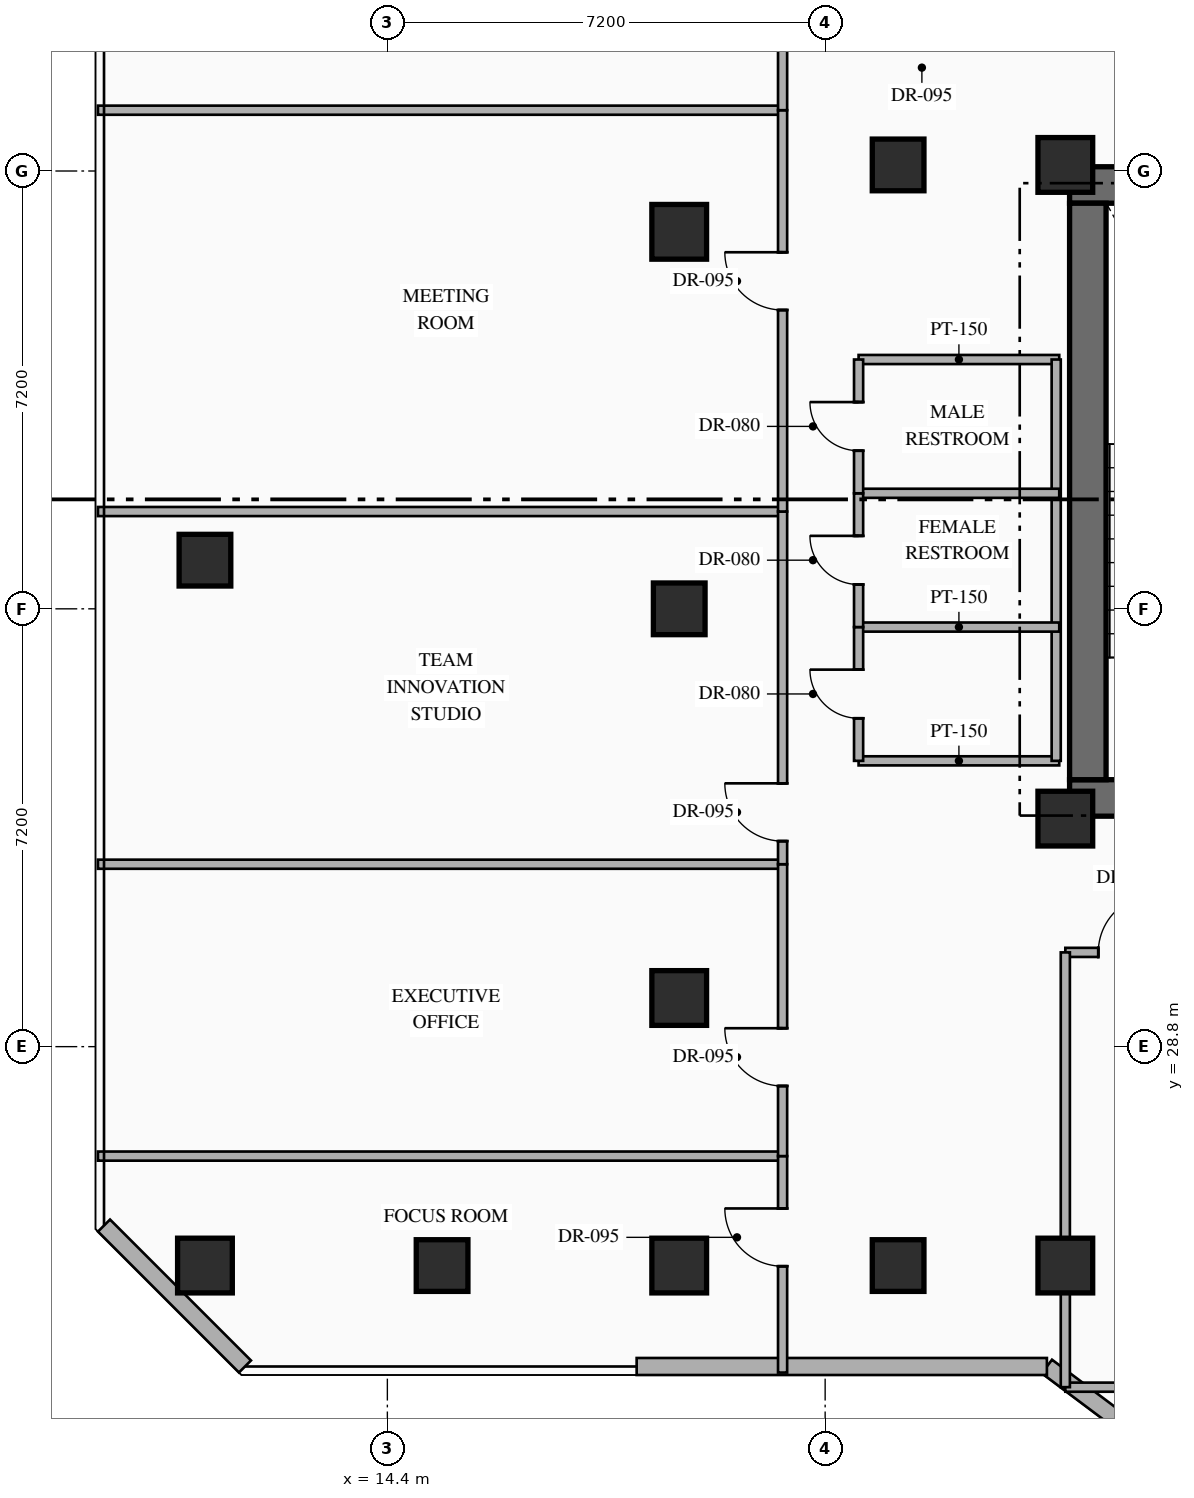
"""IFC4 building model, lengths in metres.
Left out: names, types, materials, properties, quantities, classifications, styles, units other than length and angle.
Written with IfcOpenShell. Run it as: python <this file> out.ifc"""

import sys

from ifc_helpers import new_model, si_unit, direction, frame, frame_2d, origin, origin_2d, place, context, subcontext, project, spatial, rectangle, hollow_rectangle, extrude, element, fill, save


model = new_model("IFC4")
c1 = context("Model", 3, precision=1e-05, world=origin(), true_north=direction((0.0, 1.0)))
c2 = subcontext(c1, "Body", "Model", "MODEL_VIEW")
j1 = project(units=[si_unit("LENGTHUNIT", "METRE"), si_unit("PLANEANGLEUNIT", "RADIAN")], contexts=[c1])
p1 = place(None, origin())
s1 = spatial("IfcSite", under=j1, at=p1, CompositionType="ELEMENT")
p2 = place(p1, origin())
s2 = spatial("IfcBuilding", under=s1, at=p2, CompositionType="ELEMENT")
p3 = place(p2, frame((0.0, 0.0, 122.85)))
s3 = spatial("IfcBuildingStorey", under=s2, at=p3, CompositionType="ELEMENT", Elevation=122.85)
p4 = place(p3, frame((25.62, 32.89, 0.0), z_axis=(0.0, 0.0, 1.0), x_axis=(1.0, 0.0, 0.0)))
e1 = element("IfcWall", 1, at=p4, inside=s3, PredefinedType="SHEAR", context=c2, shape_type="SweptSolid", body=[
    extrude(rectangle(XDim=7.78, YDim=0.6, at=frame_2d((3.89, 0.0))), origin(), (0.0, 0.0, 1.0), 3.6),
])
p5 = place(p4, frame((2.83, 0.0, 0.0)))
e2 = element("IfcOpeningElement", 2, at=p5, cuts=e1, PredefinedType="OPENING", context=c2, shape_type="SweptSolid", body=[
    extrude(rectangle(XDim=1.1, YDim=2.2, at=frame_2d((0.55, 1.1))), frame((0.0, 0.31, 0.0), z_axis=(0.0, -1.0, 0.0), x_axis=(1.0, 0.0, 0.0)), (0.0, 0.0, 1.0), 0.62),
])
p6 = place(p4, frame((5.58, 0.0, 0.0)))
e3 = element("IfcOpeningElement", 3, at=p6, cuts=e1, PredefinedType="OPENING", context=c2, shape_type="SweptSolid", body=[
    extrude(rectangle(XDim=1.1, YDim=2.15, at=frame_2d((0.55, 1.075))), frame((0.0, 0.31, 0.0), z_axis=(0.0, -1.0, 0.0), x_axis=(1.0, 0.0, 0.0)), (0.0, 0.0, 1.0), 0.62),
])
p7 = place(p3, frame((25.62, 42.97, 0.0), z_axis=(0.0, 0.0, 1.0), x_axis=(1.0, 0.0, 0.0)))
e4 = element("IfcWall", 4, at=p7, inside=s3, PredefinedType="SHEAR", context=c2, shape_type="SweptSolid", body=[
    extrude(rectangle(XDim=7.78, YDim=0.6, at=frame_2d((3.89, 0.0))), origin(), (0.0, 0.0, 1.0), 3.6),
])
p8 = place(p3, frame((25.92, 33.19, 0.0), z_axis=(0.0, 0.0, 1.0), x_axis=(0.0, 1.0, 0.0)))
e5 = element("IfcWall", 5, at=p8, inside=s3, PredefinedType="SHEAR", context=c2, shape_type="SweptSolid", body=[
    extrude(rectangle(XDim=9.48, YDim=0.6, at=frame_2d((4.74, 0.0))), origin(), (0.0, 0.0, 1.0), 3.6),
])
for number, where, z_axis, x_axis in (
    (6, (25.55, 32.55, 0.0), (0.0, 0.0, 1.0), (1.0, 0.0, 0.0)),
    (7, (25.55, 43.3, 0.0), (0.0, 0.0, 1.0), (1.0, 0.0, 0.0)),
):
    element("IfcColumn", number, at=place(p3, frame(where, z_axis=z_axis, x_axis=x_axis)), inside=s3, PredefinedType="COLUMN", context=c2, shape_type="SweptSolid", body=[
        extrude(rectangle(XDim=0.9, YDim=0.9, at=origin_2d()), origin(), (0.0, 0.0, 1.0), 3.6),
    ])
for number, where, z_axis, x_axis in (
    (8, (25.55, 25.2, 0.0), (0.0, 0.0, 1.0), (1.0, 0.0, 0.0)),
    (9, (11.4, 25.2, 0.0), (0.0, 0.0, 1.0), (1.0, 0.0, 0.0)),
    (10, (19.2, 25.2, 0.0), (0.0, 0.0, 1.0), (1.0, 0.0, 0.0)),
    (11, (19.2, 29.6, 0.0), (0.0, 0.0, 1.0), (1.0, 0.0, 0.0)),
    (12, (19.2, 42.2, 0.0), (0.0, 0.0, 1.0), (1.0, 0.0, 0.0)),
):
    element("IfcColumn", number, at=place(p3, frame(where, z_axis=z_axis, x_axis=x_axis)), inside=s3, PredefinedType="COLUMN", context=c2, shape_type="SweptSolid", body=[
        extrude(hollow_rectangle(XDim=0.9, YDim=0.9, WallThickness=0.036, at=origin_2d()), origin(), (0.0, 0.0, 1.0), 3.6),
    ])
for number, where, z_axis, x_axis in (
    (13, (22.8, 25.2, 0.0), (0.0, 0.0, 1.0), (1.0, 0.0, 0.0)),
    (14, (22.8, 43.3, 0.0), (0.0, 0.0, 1.0), (1.0, 0.0, 0.0)),
    (15, (11.4, 36.8, 0.0), (0.0, 0.0, 1.0), (1.0, 0.0, 0.0)),
    (16, (19.2, 36.0, 0.0), (0.0, 0.0, 1.0), (1.0, 0.0, 0.0)),
    (17, (15.3, 25.2, 0.0), (0.0, 0.0, 1.0), (1.0, 0.0, 0.0)),
):
    element("IfcColumn", number, at=place(p3, frame(where, z_axis=z_axis, x_axis=x_axis)), inside=s3, PredefinedType="COLUMN", context=c2, shape_type="SweptSolid", body=[
        extrude(hollow_rectangle(XDim=0.85, YDim=0.85, WallThickness=0.032, at=origin_2d()), origin(), (0.0, 0.0, 1.0), 3.6),
    ])
p9 = place(p3, frame((53.318, 2.487, 0.0), z_axis=(0.0, 0.0, 1.0), x_axis=(-0.800004174678, 0.599994433723, 0.0)))
e18 = element("IfcWall", 18, at=p9, inside=s3, PredefinedType="STANDARD", context=c2, shape_type="SweptSolid", body=[
    extrude(rectangle(XDim=35.089, YDim=0.28, at=frame_2d((17.544, 0.0))), origin(), (0.0, 0.0, 1.0), 3.35),
])
p10 = place(p3, frame((25.247, 23.54, 0.0), z_axis=(0.0, 0.0, 1.0), x_axis=(-1.0, 0.0, 0.0)))
e19 = element("IfcWall", 19, at=p10, inside=s3, PredefinedType="STANDARD", context=c2, shape_type="SweptSolid", body=[
    extrude(rectangle(XDim=6.747, YDim=0.28, at=frame_2d((3.374, 0.0))), origin(), (0.0, 0.0, 1.0), 3.35),
])
p11 = place(p3, frame((12.058, 23.54, 0.0), z_axis=(0.0, 0.0, 1.0), x_axis=(-0.707144017911, 0.707069542501, 0.0)))
e20 = element("IfcWall", 20, at=p11, inside=s3, PredefinedType="STANDARD", context=c2, shape_type="SweptSolid", body=[
    extrude(rectangle(XDim=3.278, YDim=0.28, at=frame_2d((1.639, 0.0))), origin(), (0.0, 0.0, 1.0), 3.35),
])
for number, where, z_axis, x_axis in (
    (21, (22.15, 33.5, 0.0), (0.0, 0.0, 1.0), (1.0, 0.0, 0.0)),
    (22, (22.15, 40.1, 0.0), (0.0, 0.0, 1.0), (1.0, 0.0, 0.0)),
):
    element("IfcWall", number, at=place(p3, frame(where, z_axis=z_axis, x_axis=x_axis)), inside=s3, PredefinedType="PARTITIONING", context=c2, shape_type="SweptSolid", body=[
        extrude(rectangle(XDim=3.3, YDim=0.15, at=frame_2d((1.65, 0.0))), origin(), (0.0, 0.0, 1.0), 3.35),
    ])
p12 = place(p3, frame((25.4, 33.5, 0.0), z_axis=(0.0, 0.0, 1.0), x_axis=(0.0, 1.0, 0.0)))
e23 = element("IfcWall", 23, at=p12, inside=s3, PredefinedType="PARTITIONING", context=c2, shape_type="SweptSolid", body=[
    extrude(rectangle(XDim=6.6, YDim=0.15, at=frame_2d((3.3, 0.0))), origin(), (0.0, 0.0, 1.0), 3.35),
])
for number, where, z_axis, x_axis in (
    (24, (22.15, 35.7, 0.0), (0.0, 0.0, 1.0), (1.0, 0.0, 0.0)),
    (25, (22.15, 37.9, 0.0), (0.0, 0.0, 1.0), (1.0, 0.0, 0.0)),
):
    element("IfcWall", number, at=place(p3, frame(where, z_axis=z_axis, x_axis=x_axis)), inside=s3, PredefinedType="PARTITIONING", context=c2, shape_type="SweptSolid", body=[
        extrude(rectangle(XDim=3.3, YDim=0.15, at=frame_2d((1.65, 0.0))), origin(), (0.0, 0.0, 1.0), 3.35),
    ])
p13 = place(p3, frame((22.15, 33.5, 0.0), z_axis=(0.0, 0.0, 1.0), x_axis=(0.0, 1.0, 0.0)))
e26 = element("IfcWall", 26, at=p13, inside=s3, PredefinedType="PARTITIONING", context=c2, shape_type="SweptSolid", body=[
    extrude(rectangle(XDim=2.2, YDim=0.15, at=frame_2d((1.1, 0.0))), origin(), (0.0, 0.0, 1.0), 3.35),
])
p14 = place(p13, frame((0.7, 0.0, 0.0)))
e27 = element("IfcOpeningElement", 27, at=p14, cuts=e26, PredefinedType="OPENING", context=c2, shape_type="SweptSolid", body=[
    extrude(rectangle(XDim=0.8, YDim=2.06, at=frame_2d((0.4, 1.03))), frame((0.0, 0.085, 0.0), z_axis=(0.0, -1.0, 0.0), x_axis=(1.0, 0.0, 0.0)), (0.0, 0.0, 1.0), 0.17),
])
p15 = place(p3, frame((22.15, 35.7, 0.0), z_axis=(0.0, 0.0, 1.0), x_axis=(0.0, 1.0, 0.0)))
e28 = element("IfcWall", 28, at=p15, inside=s3, PredefinedType="PARTITIONING", context=c2, shape_type="SweptSolid", body=[
    extrude(rectangle(XDim=2.2, YDim=0.15, at=frame_2d((1.1, 0.0))), origin(), (0.0, 0.0, 1.0), 3.35),
])
p16 = place(p15, frame((0.7, 0.0, 0.0)))
e29 = element("IfcOpeningElement", 29, at=p16, cuts=e28, PredefinedType="OPENING", context=c2, shape_type="SweptSolid", body=[
    extrude(rectangle(XDim=0.8, YDim=2.06, at=frame_2d((0.4, 1.03))), frame((0.0, 0.085, 0.0), z_axis=(0.0, -1.0, 0.0), x_axis=(1.0, 0.0, 0.0)), (0.0, 0.0, 1.0), 0.17),
])
p17 = place(p3, frame((22.15, 37.9, 0.0), z_axis=(0.0, 0.0, 1.0), x_axis=(0.0, 1.0, 0.0)))
e30 = element("IfcWall", 30, at=p17, inside=s3, PredefinedType="PARTITIONING", context=c2, shape_type="SweptSolid", body=[
    extrude(rectangle(XDim=2.2, YDim=0.15, at=frame_2d((1.1, 0.0))), origin(), (0.0, 0.0, 1.0), 3.35),
])
p18 = place(p17, frame((0.7, 0.0, 0.0)))
e31 = element("IfcOpeningElement", 31, at=p18, cuts=e30, PredefinedType="OPENING", context=c2, shape_type="SweptSolid", body=[
    extrude(rectangle(XDim=0.8, YDim=2.06, at=frame_2d((0.4, 1.03))), frame((0.0, 0.085, 0.0), z_axis=(0.0, -1.0, 0.0), x_axis=(1.0, 0.0, 0.0)), (0.0, 0.0, 1.0), 0.17),
])
p19 = place(p3, frame((25.55, 23.2, 0.0), z_axis=(0.0, 0.0, 1.0), x_axis=(1.0, 0.0, 0.0)))
e32 = element("IfcWall", 32, at=p19, inside=s3, PredefinedType="PARTITIONING", context=c2, shape_type="SweptSolid", body=[
    extrude(rectangle(XDim=4.95, YDim=0.15, at=frame_2d((2.475, 0.0))), origin(), (0.0, 0.0, 1.0), 3.35),
])
p20 = place(p3, frame((25.55, 30.35, 0.0), z_axis=(0.0, 0.0, 1.0), x_axis=(1.0, 0.0, 0.0)))
e33 = element("IfcWall", 33, at=p20, inside=s3, PredefinedType="PARTITIONING", context=c2, shape_type="SweptSolid", body=[
    extrude(rectangle(XDim=4.95, YDim=0.15, at=frame_2d((2.475, 0.0))), origin(), (0.0, 0.0, 1.0), 3.35),
])
p21 = place(p20, frame((0.542, 0.0, 0.0)))
e34 = element("IfcOpeningElement", 34, at=p21, cuts=e33, PredefinedType="OPENING", context=c2, shape_type="SweptSolid", body=[
    extrude(rectangle(XDim=0.95, YDim=2.15, at=frame_2d((0.475, 1.075))), frame((0.0, 0.085, 0.0), z_axis=(0.0, -1.0, 0.0), x_axis=(1.0, 0.0, 0.0)), (0.0, 0.0, 1.0), 0.17),
])
p22 = place(p3, frame((25.55, 23.2, 0.0), z_axis=(0.0, 0.0, 1.0), x_axis=(0.0, 1.0, 0.0)))
e35 = element("IfcWall", 35, at=p22, inside=s3, PredefinedType="PARTITIONING", context=c2, shape_type="SweptSolid", body=[
    extrude(rectangle(XDim=7.15, YDim=0.15, at=frame_2d((3.575, 0.0))), origin(), (0.0, 0.0, 1.0), 2.695),
])
p23 = place(p3, frame((9.64, 27.0, 0.0), z_axis=(0.0, 0.0, 1.0), x_axis=(1.0, 0.0, 0.0)))
e36 = element("IfcWall", 36, at=p23, inside=s3, PredefinedType="PARTITIONING", context=c2, shape_type="SweptSolid", body=[
    extrude(rectangle(XDim=11.26, YDim=0.15, at=frame_2d((5.63, 0.0))), origin(), (0.0, 0.0, 1.0), 3.35),
])
p24 = place(p3, frame((20.9, 23.44, 0.0), z_axis=(0.0, 0.0, 1.0), x_axis=(0.0, 1.0, 0.0)))
e37 = element("IfcWall", 37, at=p24, inside=s3, PredefinedType="PARTITIONING", context=c2, shape_type="SweptSolid", body=[
    extrude(rectangle(XDim=3.56, YDim=0.15, at=frame_2d((1.78, 0.0))), origin(), (0.0, 0.0, 1.0), 3.35),
])
p25 = place(p24, frame((1.749, 0.0, 0.0)))
e38 = element("IfcOpeningElement", 38, at=p25, cuts=e37, PredefinedType="OPENING", context=c2, shape_type="SweptSolid", body=[
    extrude(rectangle(XDim=0.95, YDim=2.15, at=frame_2d((0.475, 1.075))), frame((0.0, 0.085, 0.0), z_axis=(0.0, -1.0, 0.0), x_axis=(1.0, 0.0, 0.0)), (0.0, 0.0, 1.0), 0.17),
])
p26 = place(p3, frame((9.64, 31.8, 0.0), z_axis=(0.0, 0.0, 1.0), x_axis=(1.0, 0.0, 0.0)))
e39 = element("IfcWall", 39, at=p26, inside=s3, PredefinedType="PARTITIONING", context=c2, shape_type="SweptSolid", body=[
    extrude(rectangle(XDim=11.26, YDim=0.15, at=frame_2d((5.63, 0.0))), origin(), (0.0, 0.0, 1.0), 3.35),
])
p27 = place(p3, frame((20.9, 27.0, 0.0), z_axis=(0.0, 0.0, 1.0), x_axis=(0.0, 1.0, 0.0)))
e40 = element("IfcWall", 40, at=p27, inside=s3, PredefinedType="PARTITIONING", context=c2, shape_type="SweptSolid", body=[
    extrude(rectangle(XDim=4.8, YDim=0.15, at=frame_2d((2.4, 0.0))), origin(), (0.0, 0.0, 1.0), 3.35),
])
p28 = place(p27, frame((1.153, 0.0, 0.0)))
e41 = element("IfcOpeningElement", 41, at=p28, cuts=e40, PredefinedType="OPENING", context=c2, shape_type="SweptSolid", body=[
    extrude(rectangle(XDim=0.95, YDim=2.15, at=frame_2d((0.475, 1.075))), frame((0.0, 0.085, 0.0), z_axis=(0.0, -1.0, 0.0), x_axis=(1.0, 0.0, 0.0)), (0.0, 0.0, 1.0), 0.17),
])
p29 = place(p3, frame((9.64, 37.6, 0.0), z_axis=(0.0, 0.0, 1.0), x_axis=(1.0, 0.0, 0.0)))
e42 = element("IfcWall", 42, at=p29, inside=s3, PredefinedType="PARTITIONING", context=c2, shape_type="SweptSolid", body=[
    extrude(rectangle(XDim=11.26, YDim=0.15, at=frame_2d((5.63, 0.0))), origin(), (0.0, 0.0, 1.0), 3.35),
])
p30 = place(p3, frame((20.9, 31.8, 0.0), z_axis=(0.0, 0.0, 1.0), x_axis=(0.0, 1.0, 0.0)))
e43 = element("IfcWall", 43, at=p30, inside=s3, PredefinedType="PARTITIONING", context=c2, shape_type="SweptSolid", body=[
    extrude(rectangle(XDim=5.8, YDim=0.15, at=frame_2d((2.9, 0.0))), origin(), (0.0, 0.0, 1.0), 3.35),
])
p31 = place(p30, frame((0.38, 0.0, 0.0)))
e44 = element("IfcOpeningElement", 44, at=p31, cuts=e43, PredefinedType="OPENING", context=c2, shape_type="SweptSolid", body=[
    extrude(rectangle(XDim=0.95, YDim=2.15, at=frame_2d((0.475, 1.075))), frame((0.0, 0.085, 0.0), z_axis=(0.0, -1.0, 0.0), x_axis=(1.0, 0.0, 0.0)), (0.0, 0.0, 1.0), 0.17),
])
p32 = place(p3, frame((9.64, 44.2, 0.0), z_axis=(0.0, 0.0, 1.0), x_axis=(1.0, 0.0, 0.0)))
e45 = element("IfcWall", 45, at=p32, inside=s3, PredefinedType="PARTITIONING", context=c2, shape_type="SweptSolid", body=[
    extrude(rectangle(XDim=11.26, YDim=0.15, at=frame_2d((5.63, 0.0))), origin(), (0.0, 0.0, 1.0), 3.35),
])
p33 = place(p3, frame((20.9, 37.6, 0.0), z_axis=(0.0, 0.0, 1.0), x_axis=(0.0, 1.0, 0.0)))
e46 = element("IfcWall", 46, at=p33, inside=s3, PredefinedType="PARTITIONING", context=c2, shape_type="SweptSolid", body=[
    extrude(rectangle(XDim=6.6, YDim=0.15, at=frame_2d((3.3, 0.0))), origin(), (0.0, 0.0, 1.0), 3.35),
])
p34 = place(p33, frame((3.314, 0.0, 0.0)))
e47 = element("IfcOpeningElement", 47, at=p34, cuts=e46, PredefinedType="OPENING", context=c2, shape_type="SweptSolid", body=[
    extrude(rectangle(XDim=0.95, YDim=2.15, at=frame_2d((0.475, 1.075))), frame((0.0, 0.085, 0.0), z_axis=(0.0, -1.0, 0.0), x_axis=(1.0, 0.0, 0.0)), (0.0, 0.0, 1.0), 0.17),
])
p35 = place(p3, frame((20.9, 44.2, 0.0), z_axis=(0.0, 0.0, 1.0), x_axis=(0.0, 1.0, 0.0)))
e48 = element("IfcWall", 48, at=p35, inside=s3, PredefinedType="PARTITIONING", context=c2, shape_type="SweptSolid", body=[
    extrude(rectangle(XDim=6.16, YDim=0.15, at=frame_2d((3.08, 0.0))), origin(), (0.0, 0.0, 1.0), 3.35),
])
p36 = place(p35, frame((2.605, 0.0, 0.0)))
e49 = element("IfcOpeningElement", 49, at=p36, cuts=e48, PredefinedType="OPENING", context=c2, shape_type="SweptSolid", body=[
    extrude(rectangle(XDim=0.95, YDim=2.15, at=frame_2d((0.475, 1.075))), frame((0.0, 0.085, 0.0), z_axis=(0.0, -1.0, 0.0), x_axis=(1.0, 0.0, 0.0)), (0.0, 0.0, 1.0), 0.17),
])
p37 = place(p14, origin())
e50 = element("IfcDoor", 50, at=p37, inside=s3, OperationType="SINGLE_SWING_RIGHT", PredefinedType="DOOR", context=c2, shape_type="SweptSolid", body=[
    extrude(rectangle(XDim=0.8, YDim=2.06, at=frame_2d((0.4, 1.03))), frame((0.0, 0.025, 0.0), z_axis=(0.0, -1.0, 0.0), x_axis=(1.0, 0.0, 0.0)), (0.0, 0.0, 1.0), 0.05),
])
fill(e27, e50)
p38 = place(p16, origin())
e51 = element("IfcDoor", 51, at=p38, inside=s3, OperationType="SINGLE_SWING_RIGHT", PredefinedType="DOOR", context=c2, shape_type="SweptSolid", body=[
    extrude(rectangle(XDim=0.8, YDim=2.06, at=frame_2d((0.4, 1.03))), frame((0.0, 0.025, 0.0), z_axis=(0.0, -1.0, 0.0), x_axis=(1.0, 0.0, 0.0)), (0.0, 0.0, 1.0), 0.05),
])
fill(e29, e51)
p39 = place(p18, origin())
e52 = element("IfcDoor", 52, at=p39, inside=s3, OperationType="SINGLE_SWING_RIGHT", PredefinedType="DOOR", context=c2, shape_type="SweptSolid", body=[
    extrude(rectangle(XDim=0.8, YDim=2.06, at=frame_2d((0.4, 1.03))), frame((0.0, 0.025, 0.0), z_axis=(0.0, -1.0, 0.0), x_axis=(1.0, 0.0, 0.0)), (0.0, 0.0, 1.0), 0.05),
])
fill(e31, e52)
p40 = place(p21, origin())
e53 = element("IfcDoor", 53, at=p40, inside=s3, OperationType="SINGLE_SWING_RIGHT", PredefinedType="DOOR", context=c2, shape_type="SweptSolid", body=[
    extrude(rectangle(XDim=0.95, YDim=2.15, at=frame_2d((0.475, 1.075))), frame((0.0, 0.025, 0.0), z_axis=(0.0, -1.0, 0.0), x_axis=(1.0, 0.0, 0.0)), (0.0, 0.0, 1.0), 0.05),
])
fill(e34, e53)
p41 = place(p25, origin())
e54 = element("IfcDoor", 54, at=p41, inside=s3, OperationType="SINGLE_SWING_RIGHT", PredefinedType="DOOR", context=c2, shape_type="SweptSolid", body=[
    extrude(rectangle(XDim=0.95, YDim=2.15, at=frame_2d((0.475, 1.075))), frame((0.0, 0.025, 0.0), z_axis=(0.0, -1.0, 0.0), x_axis=(1.0, 0.0, 0.0)), (0.0, 0.0, 1.0), 0.05),
])
fill(e38, e54)
p42 = place(p28, origin())
e55 = element("IfcDoor", 55, at=p42, inside=s3, OperationType="SINGLE_SWING_RIGHT", PredefinedType="DOOR", context=c2, shape_type="SweptSolid", body=[
    extrude(rectangle(XDim=0.95, YDim=2.15, at=frame_2d((0.475, 1.075))), frame((0.0, 0.025, 0.0), z_axis=(0.0, -1.0, 0.0), x_axis=(1.0, 0.0, 0.0)), (0.0, 0.0, 1.0), 0.05),
])
fill(e41, e55)
p43 = place(p31, origin())
e56 = element("IfcDoor", 56, at=p43, inside=s3, OperationType="SINGLE_SWING_RIGHT", PredefinedType="DOOR", context=c2, shape_type="SweptSolid", body=[
    extrude(rectangle(XDim=0.95, YDim=2.15, at=frame_2d((0.475, 1.075))), frame((0.0, 0.025, 0.0), z_axis=(0.0, -1.0, 0.0), x_axis=(1.0, 0.0, 0.0)), (0.0, 0.0, 1.0), 0.05),
])
fill(e44, e56)
p44 = place(p34, origin())
e57 = element("IfcDoor", 57, at=p44, inside=s3, OperationType="SINGLE_SWING_RIGHT", PredefinedType="DOOR", context=c2, shape_type="SweptSolid", body=[
    extrude(rectangle(XDim=0.95, YDim=2.15, at=frame_2d((0.475, 1.075))), frame((0.0, 0.025, 0.0), z_axis=(0.0, -1.0, 0.0), x_axis=(1.0, 0.0, 0.0)), (0.0, 0.0, 1.0), 0.05),
])
fill(e47, e57)
save(model, sys.argv[1])
